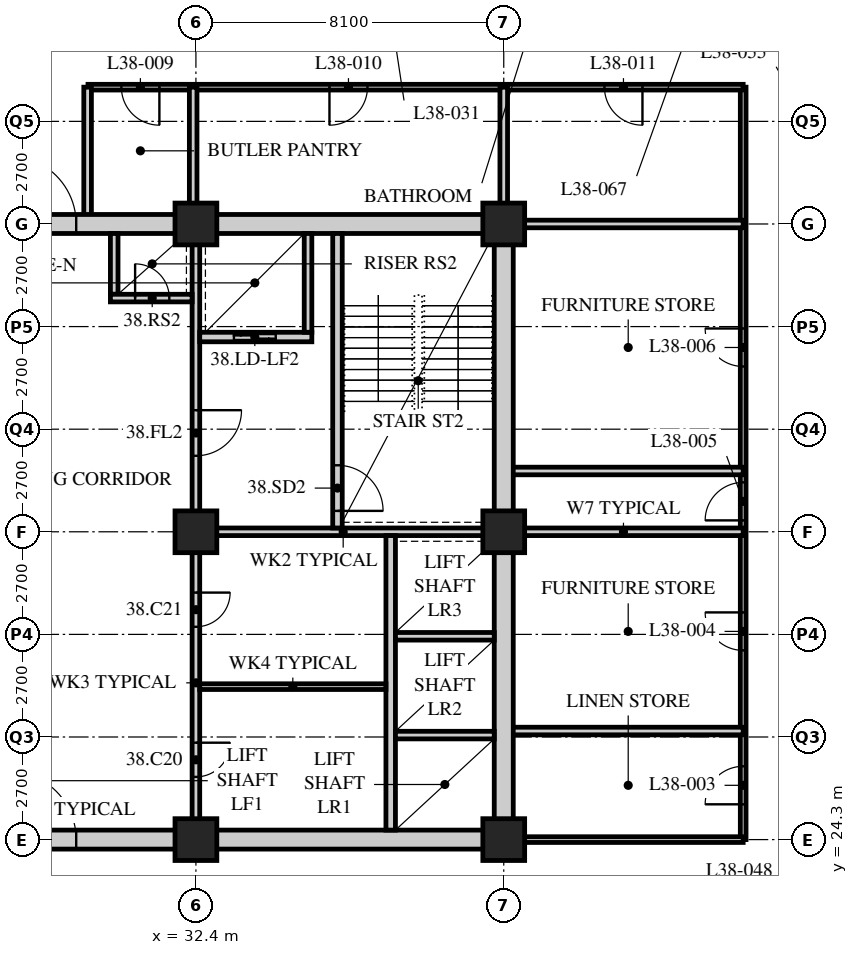
"""IFC4 building model, lengths in metres.
Left out: names, types, materials, properties, quantities, classifications, styles, units other than length and angle.
Written with IfcOpenShell. Run it as: python <this file> out.ifc"""

import sys

from ifc_helpers import new_model, si_unit, direction, frame, frame_2d, origin, origin_2d, place, context, subcontext, project, spatial, rectangle, hollow_rectangle, extrude, element, fill, save


model = new_model("IFC4")
c1 = context("Model", 3, precision=1e-05, world=origin(), true_north=direction((0.0, 1.0)))
c2 = subcontext(c1, "Body", "Model", "MODEL_VIEW")
j1 = project(units=[si_unit("LENGTHUNIT", "METRE"), si_unit("PLANEANGLEUNIT", "RADIAN")], contexts=[c1])
p1 = place(None, origin())
s1 = spatial("IfcSite", under=j1, at=p1, CompositionType="ELEMENT")
p2 = place(p1, origin())
s2 = spatial("IfcBuilding", under=s1, at=p2, CompositionType="ELEMENT")
p3 = place(p2, frame((0.0, 0.0, 147.6)))
s3 = spatial("IfcBuildingStorey", under=s2, at=p3, CompositionType="ELEMENT", Elevation=147.6)
for number, where, z_axis, x_axis in (
    (1, (32.4, 24.3, 0.0), (0.0, 0.0, 1.0), (1.0, 0.0, 0.0)),
    (2, (32.4, 32.4, 0.0), (0.0, 0.0, 1.0), (1.0, 0.0, 0.0)),
    (3, (32.4, 40.5, 0.0), (0.0, 0.0, 1.0), (1.0, 0.0, 0.0)),
    (4, (40.5, 24.3, 0.0), (0.0, 0.0, 1.0), (1.0, 0.0, 0.0)),
    (5, (40.5, 32.4, 0.0), (0.0, 0.0, 1.0), (1.0, 0.0, 0.0)),
    (6, (40.5, 40.5, 0.0), (0.0, 0.0, 1.0), (1.0, 0.0, 0.0)),
):
    element("IfcColumn", number, at=place(p3, frame(where, z_axis=z_axis, x_axis=x_axis)), inside=s3, PredefinedType="COLUMN", context=c2, shape_type="SweptSolid", body=[
        extrude(hollow_rectangle(XDim=1.1, YDim=1.1, WallThickness=0.1, at=origin_2d()), origin(), (0.0, 0.0, 1.0), 3.4),
    ])
p4 = place(p3, frame((46.8, 24.3, 0.0), z_axis=(0.0, 0.0, 1.0), x_axis=(0.0, 1.0, 0.0)))
e7 = element("IfcWall", 7, at=p4, inside=s3, PredefinedType="PARTITIONING", context=c2, shape_type="SweptSolid", body=[
    extrude(rectangle(XDim=19.8, YDim=0.15, at=frame_2d((9.9, 0.0))), origin(), (0.0, 0.0, 1.0), 3.19),
])
p5 = place(p4, frame((0.929, 0.0, 0.0)))
e8 = element("IfcOpeningElement", 8, at=p5, cuts=e7, PredefinedType="OPENING", context=c2, shape_type="SweptSolid", body=[
    extrude(rectangle(XDim=1.0, YDim=2.1, at=frame_2d((0.5, 1.05))), frame((0.0, 0.085, 0.0), z_axis=(0.0, -1.0, 0.0), x_axis=(1.0, 0.0, 0.0)), (0.0, 0.0, 1.0), 0.17),
])
p6 = place(p4, frame((4.979, 0.0, 0.0)))
e9 = element("IfcOpeningElement", 9, at=p6, cuts=e7, PredefinedType="OPENING", context=c2, shape_type="SweptSolid", body=[
    extrude(rectangle(XDim=1.0, YDim=2.1, at=frame_2d((0.5, 1.05))), frame((0.0, 0.085, 0.0), z_axis=(0.0, -1.0, 0.0), x_axis=(1.0, 0.0, 0.0)), (0.0, 0.0, 1.0), 0.17),
])
p7 = place(p4, frame((8.4, 0.0, 0.0)))
e10 = element("IfcOpeningElement", 10, at=p7, cuts=e7, PredefinedType="OPENING", context=c2, shape_type="SweptSolid", body=[
    extrude(rectangle(XDim=1.0, YDim=2.1, at=frame_2d((0.5, 1.05))), frame((0.0, 0.085, 0.0), z_axis=(0.0, -1.0, 0.0), x_axis=(1.0, 0.0, 0.0)), (0.0, 0.0, 1.0), 0.17),
])
p8 = place(p4, frame((12.45, 0.0, 0.0)))
e11 = element("IfcOpeningElement", 11, at=p8, cuts=e7, PredefinedType="OPENING", context=c2, shape_type="SweptSolid", body=[
    extrude(rectangle(XDim=1.0, YDim=2.1, at=frame_2d((0.5, 1.05))), frame((0.0, 0.085, 0.0), z_axis=(0.0, -1.0, 0.0), x_axis=(1.0, 0.0, 0.0)), (0.0, 0.0, 1.0), 0.17),
])
p9 = place(p3, frame((46.8, 44.1, 0.0), z_axis=(0.0, 0.0, 1.0), x_axis=(-1.0, 0.0, 0.0)))
e12 = element("IfcWall", 12, at=p9, inside=s3, PredefinedType="PARTITIONING", context=c2, shape_type="SweptSolid", body=[
    extrude(rectangle(XDim=17.24, YDim=0.15, at=frame_2d((8.62, 0.0))), origin(), (0.0, 0.0, 1.0), 3.19),
])
p10 = place(p9, frame((15.361, 0.0, 0.0)))
e13 = element("IfcOpeningElement", 13, at=p10, cuts=e12, PredefinedType="OPENING", context=c2, shape_type="SweptSolid", body=[
    extrude(rectangle(XDim=1.0, YDim=2.1, at=frame_2d((0.5, 1.05))), frame((0.0, 0.085, 0.0), z_axis=(0.0, -1.0, 0.0), x_axis=(1.0, 0.0, 0.0)), (0.0, 0.0, 1.0), 0.17),
])
p11 = place(p9, frame((9.886, 0.0, 0.0)))
e14 = element("IfcOpeningElement", 14, at=p11, cuts=e12, PredefinedType="OPENING", context=c2, shape_type="SweptSolid", body=[
    extrude(rectangle(XDim=1.0, YDim=2.1, at=frame_2d((0.5, 1.05))), frame((0.0, 0.085, 0.0), z_axis=(0.0, -1.0, 0.0), x_axis=(1.0, 0.0, 0.0)), (0.0, 0.0, 1.0), 0.17),
])
p12 = place(p9, frame((2.65, 0.0, 0.0)))
e15 = element("IfcOpeningElement", 15, at=p12, cuts=e12, PredefinedType="OPENING", context=c2, shape_type="SweptSolid", body=[
    extrude(rectangle(XDim=1.0, YDim=2.1, at=frame_2d((0.5, 1.05))), frame((0.0, 0.085, 0.0), z_axis=(0.0, -1.0, 0.0), x_axis=(1.0, 0.0, 0.0)), (0.0, 0.0, 1.0), 0.17),
])
p13 = place(p3, frame((40.7, 24.3, 0.0), z_axis=(0.0, 0.0, 1.0), x_axis=(1.0, 0.0, 0.0)))
e16 = element("IfcWall", 16, at=p13, inside=s3, PredefinedType="PARTITIONING", context=c2, shape_type="SweptSolid", body=[
    extrude(rectangle(XDim=6.1, YDim=0.15, at=frame_2d((3.05, 0.0))), origin(), (0.0, 0.0, 1.0), 3.19),
])
for number, where, z_axis, x_axis in (
    (17, (40.5, 32.4, 0.0), (0.0, 0.0, 1.0), (1.0, 0.0, 0.0)),
    (18, (46.8, 27.157, 0.0), (0.0, 0.0, 1.0), (-1.0, 0.0, 0.0)),
    (19, (46.8, 34.0, 0.0), (0.0, 0.0, 1.0), (-1.0, 0.0, 0.0)),
):
    element("IfcWall", number, at=place(p3, frame(where, z_axis=z_axis, x_axis=x_axis)), inside=s3, PredefinedType="SOLIDWALL", context=c2, shape_type="SweptSolid", body=[
        extrude(rectangle(XDim=6.3, YDim=0.2, at=frame_2d((3.15, 0.0))), origin(), (0.0, 0.0, 1.0), 3.19),
    ])
for number, where, z_axis, x_axis in (
    (20, (40.5, 40.5, 0.0), (0.0, 0.0, 1.0), (0.0, 1.0, 0.0)),
    (21, (32.328, 44.1, 0.0), (0.0, 0.0, 1.0), (0.0, -1.0, 0.0)),
):
    element("IfcWall", number, at=place(p3, frame(where, z_axis=z_axis, x_axis=x_axis)), inside=s3, PredefinedType="SOLIDWALL", context=c2, shape_type="SweptSolid", body=[
        extrude(rectangle(XDim=3.6, YDim=0.2, at=frame_2d((1.8, 0.0))), origin(), (0.0, 0.0, 1.0), 2.42),
    ])
p14 = place(p3, frame((29.55, 40.5, 0.0), z_axis=(0.0, 0.0, 1.0), x_axis=(0.0, 1.0, 0.0)))
e22 = element("IfcWall", 22, at=p14, inside=s3, PredefinedType="SOLIDWALL", context=c2, shape_type="SweptSolid", body=[
    extrude(rectangle(XDim=3.6, YDim=0.2, at=frame_2d((1.8, 0.0))), origin(), (0.0, 0.0, 1.0), 3.19),
])
p15 = place(p3, frame((40.5, 40.5, 0.0), z_axis=(0.0, 0.0, 1.0), x_axis=(1.0, 0.0, 0.0)))
e23 = element("IfcWall", 23, at=p15, inside=s3, PredefinedType="SOLIDWALL", context=c2, shape_type="SweptSolid", body=[
    extrude(rectangle(XDim=6.3, YDim=0.2, at=frame_2d((3.15, 0.0))), origin(), (0.0, 0.0, 1.0), 3.19),
])
p16 = place(p3, frame((15.95, 24.3, 0.0), z_axis=(0.0, 0.0, 1.0), x_axis=(1.0, 0.0, 0.0)))
e24 = element("IfcWall", 24, at=p16, inside=s3, PredefinedType="SOLIDWALL", context=c2, shape_type="SweptSolid", body=[
    extrude(rectangle(XDim=24.8, YDim=0.5, at=frame_2d((12.4, 0.0))), origin(), (0.0, 0.0, 1.0), 2.42),
])
p17 = place(p16, frame((11.5, 0.0, 0.0)))
e25 = element("IfcOpeningElement", 25, at=p17, cuts=e24, PredefinedType="OPENING", context=c2, shape_type="SweptSolid", body=[
    extrude(rectangle(XDim=1.8, YDim=2.4, at=frame_2d((0.9, 1.2))), frame((0.0, 0.26, 0.0), z_axis=(0.0, -1.0, 0.0), x_axis=(1.0, 0.0, 0.0)), (0.0, 0.0, 1.0), 0.52),
])
p18 = place(p3, frame((15.95, 40.5, 0.0), z_axis=(0.0, 0.0, 1.0), x_axis=(1.0, 0.0, 0.0)))
e26 = element("IfcWall", 26, at=p18, inside=s3, PredefinedType="SOLIDWALL", context=c2, shape_type="SweptSolid", body=[
    extrude(rectangle(XDim=24.8, YDim=0.5, at=frame_2d((12.4, 0.0))), origin(), (0.0, 0.0, 1.0), 2.42),
])
p19 = place(p18, frame((11.5, 0.0, 0.0)))
e27 = element("IfcOpeningElement", 27, at=p19, cuts=e26, PredefinedType="OPENING", context=c2, shape_type="SweptSolid", body=[
    extrude(rectangle(XDim=1.8, YDim=2.4, at=frame_2d((0.9, 1.2))), frame((0.0, 0.26, 0.0), z_axis=(0.0, -1.0, 0.0), x_axis=(1.0, 0.0, 0.0)), (0.0, 0.0, 1.0), 0.52),
])
p20 = place(p3, frame((40.5, 24.55, 0.0), z_axis=(0.0, 0.0, 1.0), x_axis=(0.0, 1.0, 0.0)))
e28 = element("IfcWall", 28, at=p20, inside=s3, PredefinedType="SOLIDWALL", context=c2, shape_type="SweptSolid", body=[
    extrude(rectangle(XDim=15.7, YDim=0.5, at=frame_2d((7.85, 0.0))), origin(), (0.0, 0.0, 1.0), 2.42),
])
p21 = place(p3, frame((32.3, 32.4, 0.0), z_axis=(0.0, 0.0, 1.0), x_axis=(1.0, 0.0, 0.0)))
e29 = element("IfcWall", 29, at=p21, inside=s3, PredefinedType="SOLIDWALL", context=c2, shape_type="SweptSolid", body=[
    extrude(rectangle(XDim=7.95, YDim=0.2, at=frame_2d((3.975, 0.0))), origin(), (0.0, 0.0, 1.0), 2.578),
])
p22 = place(p3, frame((32.4, 32.5, 0.0), z_axis=(0.0, 0.0, 1.0), x_axis=(0.0, 1.0, 0.0)))
e30 = element("IfcWall", 30, at=p22, inside=s3, PredefinedType="SOLIDWALL", context=c2, shape_type="SweptSolid", body=[
    extrude(rectangle(XDim=7.75, YDim=0.2, at=frame_2d((3.875, 0.0))), origin(), (0.0, 0.0, 1.0), 2.578),
])
p23 = place(p22, frame((1.9, 0.0, 0.0)))
e31 = element("IfcOpeningElement", 31, at=p23, cuts=e30, PredefinedType="OPENING", context=c2, shape_type="SweptSolid", body=[
    extrude(rectangle(XDim=1.2, YDim=2.1, at=frame_2d((0.6, 1.05))), frame((0.0, 0.11, 0.0), z_axis=(0.0, -1.0, 0.0), x_axis=(1.0, 0.0, 0.0)), (0.0, 0.0, 1.0), 0.22),
])
p24 = place(p3, frame((37.525, 24.55, 0.0), z_axis=(0.0, 0.0, 1.0), x_axis=(0.0, 1.0, 0.0)))
e32 = element("IfcWall", 32, at=p24, inside=s3, PredefinedType="SOLIDWALL", context=c2, shape_type="SweptSolid", body=[
    extrude(rectangle(XDim=7.75, YDim=0.25, at=frame_2d((3.875, 0.0))), origin(), (0.0, 0.0, 1.0), 3.19),
])
for number, where, z_axis, x_axis in (
    (33, (37.65, 27.05, 0.0), (0.0, 0.0, 1.0), (1.0, 0.0, 0.0)),
    (34, (37.65, 29.65, 0.0), (0.0, 0.0, 1.0), (1.0, 0.0, 0.0)),
):
    element("IfcWall", number, at=place(p3, frame(where, z_axis=z_axis, x_axis=x_axis)), inside=s3, PredefinedType="SOLIDWALL", context=c2, shape_type="SweptSolid", body=[
        extrude(rectangle(XDim=2.6, YDim=0.2, at=frame_2d((1.3, 0.0))), origin(), (0.0, 0.0, 1.0), 3.19),
    ])
p25 = place(p3, frame((36.125, 32.5, 0.0), z_axis=(0.0, 0.0, 1.0), x_axis=(0.0, 1.0, 0.0)))
e35 = element("IfcWall", 35, at=p25, inside=s3, PredefinedType="SOLIDWALL", context=c2, shape_type="SweptSolid", body=[
    extrude(rectangle(XDim=7.75, YDim=0.25, at=frame_2d((3.875, 0.0))), origin(), (0.0, 0.0, 1.0), 3.19),
])
p26 = place(p25, frame((0.45, 0.0, 0.0)))
e36 = element("IfcOpeningElement", 36, at=p26, cuts=e35, PredefinedType="OPENING", context=c2, shape_type="SweptSolid", body=[
    extrude(rectangle(XDim=1.2, YDim=2.1, at=frame_2d((0.6, 1.05))), frame((0.0, 0.135, 0.0), z_axis=(0.0, -1.0, 0.0), x_axis=(1.0, 0.0, 0.0)), (0.0, 0.0, 1.0), 0.27),
])
p27 = place(p3, frame((32.5, 37.525, 0.0), z_axis=(0.0, 0.0, 1.0), x_axis=(1.0, 0.0, 0.0)))
e37 = element("IfcWall", 37, at=p27, inside=s3, PredefinedType="SOLIDWALL", context=c2, shape_type="SweptSolid", body=[
    extrude(rectangle(XDim=2.95, YDim=0.25, at=frame_2d((1.475, 0.0))), origin(), (0.0, 0.0, 1.0), 3.19),
])
p28 = place(p27, frame((0.9, 0.0, 0.0)))
e38 = element("IfcOpeningElement", 38, at=p28, cuts=e37, PredefinedType="OPENING", context=c2, shape_type="SweptSolid", body=[
    extrude(rectangle(XDim=1.1, YDim=2.4, at=frame_2d((0.55, 1.2))), frame((0.0, 0.135, 0.0), z_axis=(0.0, -1.0, 0.0), x_axis=(1.0, 0.0, 0.0)), (0.0, 0.0, 1.0), 0.27),
])
p29 = place(p3, frame((35.35, 37.65, 0.0), z_axis=(0.0, 0.0, 1.0), x_axis=(0.0, 1.0, 0.0)))
e39 = element("IfcWall", 39, at=p29, inside=s3, PredefinedType="SOLIDWALL", context=c2, shape_type="SweptSolid", body=[
    extrude(rectangle(XDim=2.6, YDim=0.2, at=frame_2d((1.3, 0.0))), origin(), (0.0, 0.0, 1.0), 3.19),
])
p30 = place(p3, frame((30.25, 38.65, 0.0), z_axis=(0.0, 0.0, 1.0), x_axis=(0.0, 1.0, 0.0)))
e40 = element("IfcWall", 40, at=p30, inside=s3, PredefinedType="SOLIDWALL", context=c2, shape_type="SweptSolid", body=[
    extrude(rectangle(XDim=1.6, YDim=0.2, at=frame_2d((0.8, 0.0))), origin(), (0.0, 0.0, 1.0), 3.19),
])
p31 = place(p3, frame((30.15, 38.55, 0.0), z_axis=(0.0, 0.0, 1.0), x_axis=(1.0, 0.0, 0.0)))
e41 = element("IfcWall", 41, at=p31, inside=s3, PredefinedType="SOLIDWALL", context=c2, shape_type="SweptSolid", body=[
    extrude(rectangle(XDim=2.15, YDim=0.2, at=frame_2d((1.075, 0.0))), origin(), (0.0, 0.0, 1.0), 3.19),
])
p32 = place(p31, frame((0.65, 0.0, 0.0)))
e42 = element("IfcOpeningElement", 42, at=p32, cuts=e41, PredefinedType="OPENING", context=c2, shape_type="SweptSolid", body=[
    extrude(rectangle(XDim=0.9, YDim=2.1, at=frame_2d((0.45, 1.05))), frame((0.0, 0.11, 0.0), z_axis=(0.0, -1.0, 0.0), x_axis=(1.0, 0.0, 0.0)), (0.0, 0.0, 1.0), 0.22),
])
p33 = place(p3, frame((32.4, 24.55, 0.0), z_axis=(0.0, 0.0, 1.0), x_axis=(0.0, 1.0, 0.0)))
e43 = element("IfcWall", 43, at=p33, inside=s3, PredefinedType="PARTITIONING", context=c2, shape_type="SweptSolid", body=[
    extrude(rectangle(XDim=7.75, YDim=0.2, at=frame_2d((3.875, 0.0))), origin(), (0.0, 0.0, 1.0), 2.578),
])
p34 = place(p33, frame((1.4, 0.0, 0.0)))
e44 = element("IfcOpeningElement", 44, at=p34, cuts=e43, PredefinedType="OPENING", context=c2, shape_type="SweptSolid", body=[
    extrude(rectangle(XDim=0.9, YDim=2.1, at=frame_2d((0.45, 1.05))), frame((0.0, 0.11, 0.0), z_axis=(0.0, -1.0, 0.0), x_axis=(1.0, 0.0, 0.0)), (0.0, 0.0, 1.0), 0.22),
])
p35 = place(p33, frame((5.35, 0.0, 0.0)))
e45 = element("IfcOpeningElement", 45, at=p35, cuts=e43, PredefinedType="OPENING", context=c2, shape_type="SweptSolid", body=[
    extrude(rectangle(XDim=0.9, YDim=2.1, at=frame_2d((0.45, 1.05))), frame((0.0, 0.11, 0.0), z_axis=(0.0, -1.0, 0.0), x_axis=(1.0, 0.0, 0.0)), (0.0, 0.0, 1.0), 0.22),
])
p36 = place(p3, frame((32.5, 28.325, 0.0), z_axis=(0.0, 0.0, 1.0), x_axis=(1.0, 0.0, 0.0)))
e46 = element("IfcWall", 46, at=p36, inside=s3, PredefinedType="PARTITIONING", context=c2, shape_type="SweptSolid", body=[
    extrude(rectangle(XDim=4.9, YDim=0.15, at=frame_2d((2.45, 0.0))), origin(), (0.0, 0.0, 1.0), 3.19),
])
p37 = place(p5, origin())
e47 = element("IfcDoor", 47, at=p37, inside=s3, OperationType="SINGLE_SWING_LEFT", PredefinedType="DOOR", context=c2, shape_type="SweptSolid", body=[
    extrude(rectangle(XDim=1.0, YDim=2.1, at=frame_2d((0.5, 1.05))), frame((0.0, 0.025, 0.0), z_axis=(0.0, -1.0, 0.0), x_axis=(1.0, 0.0, 0.0)), (0.0, 0.0, 1.0), 0.05),
])
fill(e8, e47)
p38 = place(p6, origin())
e48 = element("IfcDoor", 48, at=p38, inside=s3, OperationType="SINGLE_SWING_RIGHT", PredefinedType="DOOR", context=c2, shape_type="SweptSolid", body=[
    extrude(rectangle(XDim=1.0, YDim=2.1, at=frame_2d((0.5, 1.05))), frame((0.0, 0.025, 0.0), z_axis=(0.0, -1.0, 0.0), x_axis=(1.0, 0.0, 0.0)), (0.0, 0.0, 1.0), 0.05),
])
fill(e9, e48)
p39 = place(p7, origin())
e49 = element("IfcDoor", 49, at=p39, inside=s3, OperationType="SINGLE_SWING_LEFT", PredefinedType="DOOR", context=c2, shape_type="SweptSolid", body=[
    extrude(rectangle(XDim=1.0, YDim=2.1, at=frame_2d((0.5, 1.05))), frame((0.0, 0.025, 0.0), z_axis=(0.0, -1.0, 0.0), x_axis=(1.0, 0.0, 0.0)), (0.0, 0.0, 1.0), 0.05),
])
fill(e10, e49)
p40 = place(p8, origin())
e50 = element("IfcDoor", 50, at=p40, inside=s3, OperationType="SINGLE_SWING_RIGHT", PredefinedType="DOOR", context=c2, shape_type="SweptSolid", body=[
    extrude(rectangle(XDim=1.0, YDim=2.1, at=frame_2d((0.5, 1.05))), frame((0.0, 0.025, 0.0), z_axis=(0.0, -1.0, 0.0), x_axis=(1.0, 0.0, 0.0)), (0.0, 0.0, 1.0), 0.05),
])
fill(e11, e50)
p41 = place(p10, origin())
e51 = element("IfcDoor", 51, at=p41, inside=s3, OperationType="SINGLE_SWING_LEFT", PredefinedType="DOOR", context=c2, shape_type="SweptSolid", body=[
    extrude(rectangle(XDim=1.0, YDim=2.1, at=frame_2d((0.5, 1.05))), frame((0.0, 0.025, 0.0), z_axis=(0.0, -1.0, 0.0), x_axis=(1.0, 0.0, 0.0)), (0.0, 0.0, 1.0), 0.05),
])
fill(e13, e51)
p42 = place(p11, origin())
e52 = element("IfcDoor", 52, at=p42, inside=s3, OperationType="SINGLE_SWING_RIGHT", PredefinedType="DOOR", context=c2, shape_type="SweptSolid", body=[
    extrude(rectangle(XDim=1.0, YDim=2.1, at=frame_2d((0.5, 1.05))), frame((0.0, 0.025, 0.0), z_axis=(0.0, -1.0, 0.0), x_axis=(1.0, 0.0, 0.0)), (0.0, 0.0, 1.0), 0.05),
])
fill(e14, e52)
p43 = place(p12, origin())
e53 = element("IfcDoor", 53, at=p43, inside=s3, OperationType="SINGLE_SWING_LEFT", PredefinedType="DOOR", context=c2, shape_type="SweptSolid", body=[
    extrude(rectangle(XDim=1.0, YDim=2.1, at=frame_2d((0.5, 1.05))), frame((0.0, 0.025, 0.0), z_axis=(0.0, -1.0, 0.0), x_axis=(1.0, 0.0, 0.0)), (0.0, 0.0, 1.0), 0.05),
])
fill(e15, e53)
p44 = place(p34, origin())
e54 = element("IfcDoor", 54, at=p44, inside=s3, OperationType="SINGLE_SWING_LEFT", PredefinedType="DOOR", context=c2, shape_type="SweptSolid", body=[
    extrude(rectangle(XDim=0.9, YDim=2.1, at=frame_2d((0.45, 1.05))), frame((0.0, 0.025, 0.0), z_axis=(0.0, -1.0, 0.0), x_axis=(1.0, 0.0, 0.0)), (0.0, 0.0, 1.0), 0.05),
])
fill(e44, e54)
p45 = place(p35, origin())
e55 = element("IfcDoor", 55, at=p45, inside=s3, OperationType="SINGLE_SWING_LEFT", PredefinedType="DOOR", context=c2, shape_type="SweptSolid", body=[
    extrude(rectangle(XDim=0.9, YDim=2.1, at=frame_2d((0.45, 1.05))), frame((0.0, 0.025, 0.0), z_axis=(0.0, -1.0, 0.0), x_axis=(1.0, 0.0, 0.0)), (0.0, 0.0, 1.0), 0.05),
])
fill(e45, e55)
p46 = place(p26, origin())
e56 = element("IfcDoor", 56, at=p46, inside=s3, OperationType="SINGLE_SWING_RIGHT", PredefinedType="DOOR", context=c2, shape_type="SweptSolid", body=[
    extrude(rectangle(XDim=1.2, YDim=2.1, at=frame_2d((0.6, 1.05))), frame((0.0, 0.025, 0.0), z_axis=(0.0, -1.0, 0.0), x_axis=(1.0, 0.0, 0.0)), (0.0, 0.0, 1.0), 0.05),
])
fill(e36, e56)
p47 = place(p23, origin())
e57 = element("IfcDoor", 57, at=p47, inside=s3, OperationType="SINGLE_SWING_LEFT", PredefinedType="DOOR", context=c2, shape_type="SweptSolid", body=[
    extrude(rectangle(XDim=1.2, YDim=2.1, at=frame_2d((0.6, 1.05))), frame((0.0, 0.025, 0.0), z_axis=(0.0, -1.0, 0.0), x_axis=(1.0, 0.0, 0.0)), (0.0, 0.0, 1.0), 0.05),
])
fill(e31, e57)
p48 = place(p32, origin())
e58 = element("IfcDoor", 58, at=p48, inside=s3, OperationType="SINGLE_SWING_LEFT", PredefinedType="DOOR", context=c2, shape_type="SweptSolid", body=[
    extrude(rectangle(XDim=0.9, YDim=2.1, at=frame_2d((0.45, 1.05))), frame((0.0, 0.025, 0.0), z_axis=(0.0, -1.0, 0.0), x_axis=(1.0, 0.0, 0.0)), (0.0, 0.0, 1.0), 0.05),
])
fill(e42, e58)
p49 = place(p28, origin())
e59 = element("IfcDoor", 59, at=p49, inside=s3, OperationType="DOUBLE_DOOR_SLIDING", PredefinedType="DOOR", context=c2, shape_type="SweptSolid", body=[
    extrude(rectangle(XDim=1.1, YDim=2.4, at=frame_2d((0.55, 1.2))), frame((0.0, 0.025, 0.0), z_axis=(0.0, -1.0, 0.0), x_axis=(1.0, 0.0, 0.0)), (0.0, 0.0, 1.0), 0.05),
])
fill(e38, e59)
p50 = place(p17, origin())
e60 = element("IfcDoor", 60, at=p50, inside=s3, OperationType="DOUBLE_DOOR_SINGLE_SWING", PredefinedType="DOOR", context=c2, shape_type="SweptSolid", body=[
    extrude(rectangle(XDim=1.8, YDim=2.4, at=frame_2d((0.9, 1.2))), frame((0.0, 0.025, 0.0), z_axis=(0.0, -1.0, 0.0), x_axis=(1.0, 0.0, 0.0)), (0.0, 0.0, 1.0), 0.05),
])
fill(e25, e60)
p51 = place(p19, origin())
e61 = element("IfcDoor", 61, at=p51, inside=s3, OperationType="DOUBLE_DOOR_SINGLE_SWING", PredefinedType="DOOR", context=c2, shape_type="SweptSolid", body=[
    extrude(rectangle(XDim=1.8, YDim=2.4, at=frame_2d((0.9, 1.2))), frame((0.0, 0.025, 0.0), z_axis=(0.0, -1.0, 0.0), x_axis=(1.0, 0.0, 0.0)), (0.0, 0.0, 1.0), 0.05),
])
fill(e27, e61)
save(model, sys.argv[1])
